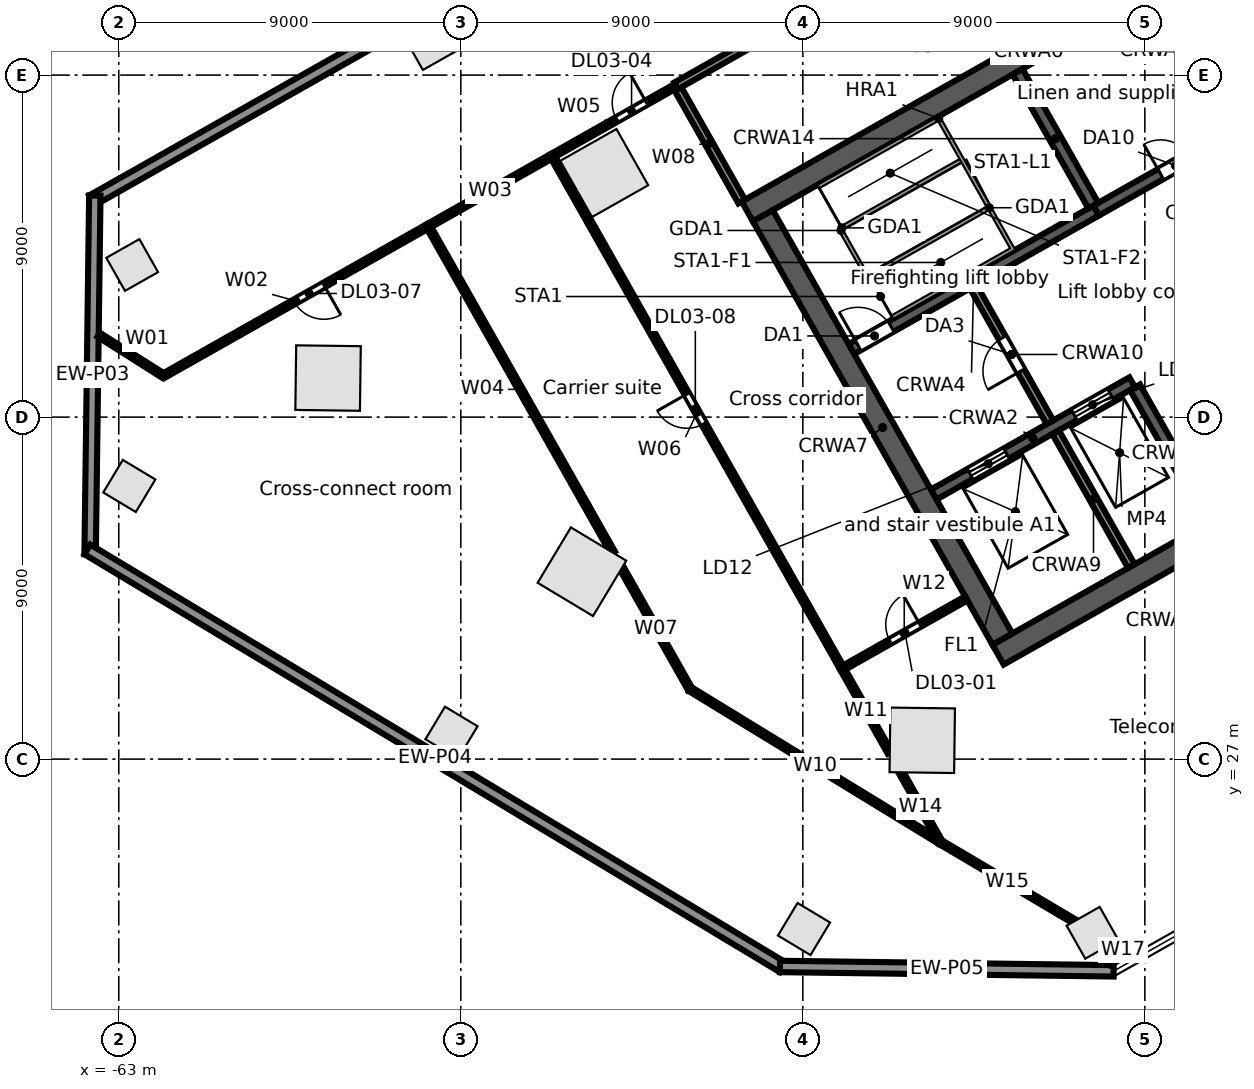
"""IFC4 building model, lengths in metres.
Left out: names, types, materials, properties, quantities, classifications, styles, units other than length and angle.
Written with IfcOpenShell. Run it as: python <this file> out.ifc"""

import sys

from ifc_helpers import new_model, si_unit, direction, frame, frame_2d, origin, origin_2d, place, context, subcontext, project, spatial, rectangle, extrude, element, fill, save


model = new_model("IFC4")
c1 = context("Model", 3, precision=1e-05, world=origin(), true_north=direction((0.0, 1.0)))
c2 = subcontext(c1, "Body", "Model", "MODEL_VIEW")
j1 = project(units=[si_unit("LENGTHUNIT", "METRE"), si_unit("PLANEANGLEUNIT", "RADIAN")], contexts=[c1])
p1 = place(None, origin())
s1 = spatial("IfcSite", under=j1, at=p1, CompositionType="ELEMENT")
p2 = place(p1, origin())
s2 = spatial("IfcBuilding", under=s1, at=p2, CompositionType="ELEMENT")
p3 = place(p2, frame((0.0, 0.0, 21.5)))
s3 = spatial("IfcBuildingStorey", under=s2, at=p3, CompositionType="ELEMENT", Elevation=21.5)
for number, where, z_axis, x_axis in (
    (1, (-50.226, 42.423, 0.0), (0.0, 0.0, 1.0), (-0.87, -0.492, 0.0)),
    (2, (-57.493, 37.027, 0.0), (0.0, 0.0, 1.0), (-0.013, -1.0, 0.0)),
    (3, (-50.812, 31.931, 0.0), (0.0, 0.0, 1.0), (0.857, -0.515, 0.0)),
    (4, (-41.858, 27.495, 0.0), (0.0, 0.0, 1.0), (1.0, -0.013, 0.0)),
):
    element("IfcColumn", number, at=place(p3, frame(where, z_axis=z_axis, x_axis=x_axis)), inside=s3, PredefinedType="COLUMN", context=c2, shape_type="SweptSolid", body=[
        extrude(rectangle(XDim=1.7, YDim=1.7, at=origin_2d()), origin(), (0.0, 0.0, 1.0), 5.0),
    ])
for number, where, z_axis, x_axis in (
    (5, (-54.81, 45.816, 0.0), (0.0, 0.0, 1.0), (-0.87, -0.492, 0.0)),
    (6, (-62.647, 40.003, 0.0), (0.0, 0.0, 1.0), (-0.87, -0.492, 0.0)),
    (7, (-62.723, 34.188, 0.0), (0.0, 0.0, 1.0), (0.857, -0.515, 0.0)),
    (8, (-54.245, 27.694, 0.0), (0.0, 0.0, 1.0), (0.857, -0.515, 0.0)),
    (9, (-44.969, 22.528, 0.0), (0.0, 0.0, 1.0), (0.857, -0.515, 0.0)),
    (10, (-37.378, 22.429, 0.0), (0.0, 0.0, 1.0), (0.87, 0.492, 0.0)),
):
    element("IfcColumn", number, at=place(p3, frame(where, z_axis=z_axis, x_axis=x_axis)), inside=s3, PredefinedType="COLUMN", context=c2, shape_type="SweptSolid", body=[
        extrude(rectangle(XDim=1.0, YDim=1.0, at=origin_2d()), origin(), (0.0, 0.0, 1.0), 4.68),
    ])
p4 = place(p3, frame((-63.707, 41.701, 0.0), z_axis=(0.0, 0.0, 1.0), x_axis=(0.870355510268, 0.492423888277, 0.0)))
e11 = element("IfcWall", 11, at=p4, inside=s3, PredefinedType="STANDARD", context=c2, shape_type="SweptSolid", body=[
    extrude(rectangle(XDim=67.903, YDim=0.3, at=frame_2d((33.952, 0.0))), origin(), (0.0, 0.0, 1.0), 4.68),
])
p5 = place(p3, frame((-63.754, 32.387, 0.0), z_axis=(0.0, 0.0, 1.0), x_axis=(0.013081929375, 0.999914427901, 0.0)))
e12 = element("IfcWall", 12, at=p5, inside=s3, PredefinedType="STANDARD", context=c2, shape_type="SweptSolid", body=[
    extrude(rectangle(XDim=9.443, YDim=0.3, at=frame_2d((4.722, 0.0))), origin(), (0.0, 0.0, 1.0), 4.68),
])
p6 = place(p3, frame((-45.526, 21.522, 0.0), z_axis=(0.0, 0.0, 1.0), x_axis=(-0.857164837164, 0.515042174903, 0.0)))
e13 = element("IfcWall", 13, at=p6, inside=s3, PredefinedType="STANDARD", context=c2, shape_type="SweptSolid", body=[
    extrude(rectangle(XDim=21.35, YDim=0.3, at=frame_2d((10.675, 0.0))), origin(), (0.0, 0.0, 1.0), 4.68),
])
p7 = place(p3, frame((-36.821, 21.428, 0.0), z_axis=(0.0, 0.0, 1.0), x_axis=(-0.999914252794, 0.013095306781, 0.0)))
e14 = element("IfcWall", 14, at=p7, inside=s3, PredefinedType="STANDARD", context=c2, shape_type="SweptSolid", body=[
    extrude(rectangle(XDim=8.781, YDim=0.3, at=frame_2d((4.391, 0.0))), origin(), (0.0, 0.0, 1.0), 4.68),
])
p8 = place(p3, frame((-39.862, 29.749, 0.0), z_axis=(0.0, 0.0, 1.0), x_axis=(0.870350116061, 0.492433422375, 0.0)))
e15 = element("IfcWall", 15, at=p8, inside=s3, PredefinedType="SOLIDWALL", context=c2, shape_type="SweptSolid", body=[
    extrude(rectangle(XDim=17.0, YDim=0.6, at=frame_2d((8.5, 0.0))), origin(), (0.0, 0.0, 1.0), 4.68),
])
p9 = place(p8, frame((7.2, 0.0, 0.0)))
e16 = element("IfcOpeningElement", 16, at=p9, cuts=e15, PredefinedType="OPENING", context=c2, shape_type="SweptSolid", body=[
    extrude(rectangle(XDim=1.2, YDim=2.1, at=frame_2d((0.6, 1.05))), frame((0.0, 0.31, 0.0), z_axis=(0.0, -1.0, 0.0), x_axis=(1.0, 0.0, 0.0)), (0.0, 0.0, 1.0), 0.62),
])
p10 = place(p3, frame((-41.556, 33.961, 0.0), z_axis=(0.0, 0.0, 1.0), x_axis=(0.870343731308, 0.492444706919, 0.0)))
e17 = element("IfcWall", 17, at=p10, inside=s3, PredefinedType="SOLIDWALL", context=c2, shape_type="SweptSolid", body=[
    extrude(rectangle(XDim=6.0, YDim=0.3, at=frame_2d((3.0, 0.0))), origin(), (0.0, 0.0, 1.0), 4.68),
])
p11 = place(p10, frame((1.1, 0.0, 0.0)))
e18 = element("IfcOpeningElement", 18, at=p11, cuts=e17, PredefinedType="OPENING", context=c2, shape_type="SweptSolid", body=[
    extrude(rectangle(XDim=1.1, YDim=2.1, at=frame_2d((0.55, 1.05))), frame((0.0, 0.16, 0.0), z_axis=(0.0, -1.0, 0.0), x_axis=(1.0, 0.0, 0.0)), (0.0, 0.0, 1.0), 0.32),
])
p12 = place(p10, frame((4.25, 0.0, 0.0)))
e19 = element("IfcOpeningElement", 19, at=p12, cuts=e17, PredefinedType="OPENING", context=c2, shape_type="SweptSolid", body=[
    extrude(rectangle(XDim=1.1, YDim=2.1, at=frame_2d((0.55, 1.05))), frame((0.0, 0.16, 0.0), z_axis=(0.0, -1.0, 0.0), x_axis=(1.0, 0.0, 0.0)), (0.0, 0.0, 1.0), 0.32),
])
p13 = place(p3, frame((-43.723, 37.791, 0.0), z_axis=(0.0, 0.0, 1.0), x_axis=(0.87035077051, 0.49243226567, 0.0)))
e20 = element("IfcWall", 20, at=p13, inside=s3, PredefinedType="SOLIDWALL", context=c2, shape_type="SweptSolid", body=[
    extrude(rectangle(XDim=7.4, YDim=0.3, at=frame_2d((3.7, 0.0))), origin(), (0.0, 0.0, 1.0), 4.68),
])
p14 = place(p13, frame((0.2, 0.0, 0.0)))
e21 = element("IfcOpeningElement", 21, at=p14, cuts=e20, PredefinedType="OPENING", context=c2, shape_type="SweptSolid", body=[
    extrude(rectangle(XDim=1.0, YDim=2.1, at=frame_2d((0.5, 1.05))), frame((0.0, 0.16, 0.0), z_axis=(0.0, -1.0, 0.0), x_axis=(1.0, 0.0, 0.0)), (0.0, 0.0, 1.0), 0.32),
])
p15 = place(p3, frame((-37.282, 41.435, 0.0), z_axis=(0.0, 0.0, 1.0), x_axis=(0.870356516133, 0.492422110414, 0.0)))
e22 = element("IfcWall", 22, at=p15, inside=s3, PredefinedType="SOLIDWALL", context=c2, shape_type="SweptSolid", body=[
    extrude(rectangle(XDim=8.4, YDim=0.3, at=frame_2d((4.2, 0.0))), origin(), (0.0, 0.0, 1.0), 4.68),
])
p16 = place(p15, frame((6.2, 0.0, 0.0)))
e23 = element("IfcOpeningElement", 23, at=p16, cuts=e22, PredefinedType="OPENING", context=c2, shape_type="SweptSolid", body=[
    extrude(rectangle(XDim=1.1, YDim=2.1, at=frame_2d((0.55, 1.05))), frame((0.0, 0.16, 0.0), z_axis=(0.0, -1.0, 0.0), x_axis=(1.0, 0.0, 0.0)), (0.0, 0.0, 1.0), 0.32),
])
p17 = place(p15, frame((1.95, 0.0, 0.0)))
e24 = element("IfcOpeningElement", 24, at=p17, cuts=e22, PredefinedType="OPENING", context=c2, shape_type="SweptSolid", body=[
    extrude(rectangle(XDim=0.9, YDim=2.1, at=frame_2d((0.45, 1.05))), frame((0.0, 0.16, 0.0), z_axis=(0.0, -1.0, 0.0), x_axis=(1.0, 0.0, 0.0)), (0.0, 0.0, 1.0), 0.32),
])
p18 = place(p3, frame((-46.461, 41.412, 0.0), z_axis=(0.0, 0.0, 1.0), x_axis=(0.870350116061, 0.492433422375, 0.0)))
e25 = element("IfcWall", 25, at=p18, inside=s3, PredefinedType="SOLIDWALL", context=c2, shape_type="SweptSolid", body=[
    extrude(rectangle(XDim=17.0, YDim=0.6, at=frame_2d((8.5, 0.0))), origin(), (0.0, 0.0, 1.0), 4.68),
])
p19 = place(p3, frame((-46.052, 41.298, 0.0), z_axis=(0.0, 0.0, 1.0), x_axis=(0.492418598281, -0.870358503186, 0.0)))
e26 = element("IfcWall", 26, at=p19, inside=s3, PredefinedType="SOLIDWALL", context=c2, shape_type="SweptSolid", body=[
    extrude(rectangle(XDim=12.8, YDim=0.6, at=frame_2d((6.4, 0.0))), origin(), (0.0, 0.0, 1.0), 4.68),
])
p20 = place(p3, frame((-38.349, 35.603, 0.0), z_axis=(0.0, 0.0, 1.0), x_axis=(0.49241474071, -0.870360685654, 0.0)))
e27 = element("IfcWall", 27, at=p20, inside=s3, PredefinedType="SOLIDWALL", context=c2, shape_type="SweptSolid", body=[
    extrude(rectangle(XDim=4.05, YDim=0.2, at=frame_2d((2.025, 0.0))), origin(), (0.0, 0.0, 1.0), 4.68),
])
p21 = place(p3, frame((-40.516, 39.433, 0.0), z_axis=(0.0, 0.0, 1.0), x_axis=(0.492453559952, -0.87033872216, 0.0)))
e28 = element("IfcWall", 28, at=p21, inside=s3, PredefinedType="PARTITIONING", context=c2, shape_type="SweptSolid", body=[
    extrude(rectangle(XDim=4.1, YDim=0.2, at=frame_2d((2.05, 0.0))), origin(), (0.0, 0.0, 1.0), 4.68),
])
p22 = place(p21, frame((1.55, 0.0, 0.0)))
e29 = element("IfcOpeningElement", 29, at=p22, cuts=e28, PredefinedType="OPENING", context=c2, shape_type="SweptSolid", body=[
    extrude(rectangle(XDim=1.0, YDim=2.1, at=frame_2d((0.5, 1.05))), frame((0.0, 0.11, 0.0), z_axis=(0.0, -1.0, 0.0), x_axis=(1.0, 0.0, 0.0)), (0.0, 0.0, 1.0), 0.22),
])
p23 = place(p3, frame((-36.26, 36.785, 0.0), z_axis=(0.0, 0.0, 1.0), x_axis=(0.492440575896, -0.870346068648, 0.0)))
e30 = element("IfcWall", 30, at=p23, inside=s3, PredefinedType="SOLIDWALL", context=c2, shape_type="SweptSolid", body=[
    extrude(rectangle(XDim=4.05, YDim=0.3, at=frame_2d((2.025, 0.0))), origin(), (0.0, 0.0, 1.0), 4.68),
])
p24 = place(p3, frame((-39.35, 45.09, 0.0), z_axis=(0.0, 0.0, 1.0), x_axis=(0.49241474071, -0.870360685654, 0.0)))
e31 = element("IfcWall", 31, at=p24, inside=s3, PredefinedType="SOLIDWALL", context=c2, shape_type="SweptSolid", body=[
    extrude(rectangle(XDim=4.05, YDim=0.3, at=frame_2d((2.025, 0.0))), origin(), (0.0, 0.0, 1.0), 4.68),
])
p25 = place(p3, frame((-35.173, 47.454, 0.0), z_axis=(0.0, 0.0, 1.0), x_axis=(0.492440575896, -0.870346068648, 0.0)))
e32 = element("IfcWall", 32, at=p25, inside=s3, PredefinedType="SOLIDWALL", context=c2, shape_type="SweptSolid", body=[
    extrude(rectangle(XDim=4.05, YDim=0.2, at=frame_2d((2.025, 0.0))), origin(), (0.0, 0.0, 1.0), 4.68),
])
p26 = place(p3, frame((-63.529, 38.167, 0.0), z_axis=(0.0, 0.0, 1.0), x_axis=(0.844913795328, -0.534902494352, 0.0)))
e33 = element("IfcWall", 33, at=p26, inside=s3, PredefinedType="PARTITIONING", context=c2, shape_type="SweptSolid", body=[
    extrude(rectangle(XDim=2.019, YDim=0.125, at=frame_2d((1.01, 0.0))), origin(), (0.0, 0.0, 1.0), 4.154),
])
p27 = place(p3, frame((-61.823, 37.087, 0.0), z_axis=(0.0, 0.0, 1.0), x_axis=(0.870379756599, 0.492381030609, 0.0)))
e34 = element("IfcWall", 34, at=p27, inside=s3, PredefinedType="PARTITIONING", context=c2, shape_type="SweptSolid", body=[
    extrude(rectangle(XDim=8.0, YDim=0.125, at=frame_2d((4.0, 0.0))), origin(), (0.0, 0.0, 1.0), 3.76),
])
p28 = place(p27, frame((3.95, 0.0, 0.0)))
e35 = element("IfcOpeningElement", 35, at=p28, cuts=e34, PredefinedType="OPENING", context=c2, shape_type="SweptSolid", body=[
    extrude(rectangle(XDim=0.9, YDim=2.1, at=frame_2d((0.45, 1.05))), frame((0.0, 0.073, 0.0), z_axis=(0.0, -1.0, 0.0), x_axis=(1.0, 0.0, 0.0)), (0.0, 0.0, 1.0), 0.145),
])
p29 = place(p3, frame((-54.86, 41.026, 0.0), z_axis=(0.0, 0.0, 1.0), x_axis=(0.870310553999, 0.492503339682, 0.0)))
e36 = element("IfcWall", 36, at=p29, inside=s3, PredefinedType="PARTITIONING", context=c2, shape_type="SweptSolid", body=[
    extrude(rectangle(XDim=3.75, YDim=0.125, at=frame_2d((1.875, 0.0))), origin(), (0.0, 0.0, 1.0), 4.048),
])
p30 = place(p3, frame((-54.86, 41.026, 0.0), z_axis=(0.0, 0.0, 1.0), x_axis=(0.492429637412, -0.870352257536, 0.0)))
e37 = element("IfcWall", 37, at=p30, inside=s3, PredefinedType="PARTITIONING", context=c2, shape_type="SweptSolid", body=[
    extrude(rectangle(XDim=9.872, YDim=0.125, at=frame_2d((4.936, 0.0))), origin(), (0.0, 0.0, 1.0), 3.742),
])
p31 = place(p3, frame((-51.596, 42.873, 0.0), z_axis=(0.0, 0.0, 1.0), x_axis=(0.87043427122, 0.492284652905, 0.0)))
e38 = element("IfcWall", 38, at=p31, inside=s3, PredefinedType="PARTITIONING", context=c2, shape_type="SweptSolid", body=[
    extrude(rectangle(XDim=3.75, YDim=0.125, at=frame_2d((1.875, 0.0))), origin(), (0.0, 0.0, 1.0), 4.68),
])
p32 = place(p31, frame((1.95, 0.0, 0.0)))
e39 = element("IfcOpeningElement", 39, at=p32, cuts=e38, PredefinedType="OPENING", context=c2, shape_type="SweptSolid", body=[
    extrude(rectangle(XDim=0.9, YDim=2.1, at=frame_2d((0.45, 1.05))), frame((0.0, 0.073, 0.0), z_axis=(0.0, -1.0, 0.0), x_axis=(1.0, 0.0, 0.0)), (0.0, 0.0, 1.0), 0.145),
])
p33 = place(p3, frame((-51.596, 42.873, 0.0), z_axis=(0.0, 0.0, 1.0), x_axis=(0.492435038471, -0.870349201692, 0.0)))
e40 = element("IfcWall", 40, at=p33, inside=s3, PredefinedType="PARTITIONING", context=c2, shape_type="SweptSolid", body=[
    extrude(rectangle(XDim=15.501, YDim=0.125, at=frame_2d((7.75, 0.0))), origin(), (0.0, 0.0, 1.0), 3.742),
])
p34 = place(p33, frame((7.2, 0.0, 0.0)))
e41 = element("IfcOpeningElement", 41, at=p34, cuts=e40, PredefinedType="OPENING", context=c2, shape_type="SweptSolid", body=[
    extrude(rectangle(XDim=0.9, YDim=2.1, at=frame_2d((0.45, 1.05))), frame((0.0, 0.073, 0.0), z_axis=(0.0, -1.0, 0.0), x_axis=(1.0, 0.0, 0.0)), (0.0, 0.0, 1.0), 0.145),
])
p35 = place(p3, frame((-49.766, 32.022, 0.0), z_axis=(0.0, 0.0, 1.0), x_axis=(0.492501810842, -0.870311419159, 0.0)))
e42 = element("IfcWall", 42, at=p35, inside=s3, PredefinedType="PARTITIONING", context=c2, shape_type="SweptSolid", body=[
    extrude(rectangle(XDim=3.655, YDim=0.125, at=frame_2d((1.828, 0.0))), origin(), (0.0, 0.0, 1.0), 3.952),
])
p36 = place(p3, frame((-48.332, 44.719, 0.0), z_axis=(0.0, 0.0, 1.0), x_axis=(0.492392845909, -0.87037307248, 0.0)))
e43 = element("IfcWall", 43, at=p36, inside=s3, PredefinedType="PARTITIONING", context=c2, shape_type="SweptSolid", body=[
    extrude(rectangle(XDim=3.5, YDim=0.2, at=frame_2d((1.75, 0.0))), origin(), (0.0, 0.0, 1.0), 3.96),
])
p37 = place(p3, frame((-48.332, 44.719, 0.0), z_axis=(0.0, 0.0, 1.0), x_axis=(0.870331650579, 0.492466057713, 0.0)))
e44 = element("IfcWall", 44, at=p37, inside=s3, PredefinedType="PARTITIONING", context=c2, shape_type="SweptSolid", body=[
    extrude(rectangle(XDim=8.5, YDim=0.2, at=frame_2d((4.25, 0.0))), origin(), (0.0, 0.0, 1.0), 4.054),
])
p38 = place(p37, frame((3.45, 0.0, 0.0)))
e45 = element("IfcOpeningElement", 45, at=p38, cuts=e44, PredefinedType="OPENING", context=c2, shape_type="SweptSolid", body=[
    extrude(rectangle(XDim=1.8, YDim=2.1, at=frame_2d((0.9, 1.05))), frame((0.0, 0.11, 0.0), z_axis=(0.0, -1.0, 0.0), x_axis=(1.0, 0.0, 0.0)), (0.0, 0.0, 1.0), 0.22),
])
p39 = place(p3, frame((-47.966, 28.841, 0.0), z_axis=(0.0, 0.0, 1.0), x_axis=(0.8531669284, -0.521637989686, 0.0)))
e46 = element("IfcWall", 46, at=p39, inside=s3, PredefinedType="PARTITIONING", context=c2, shape_type="SweptSolid", body=[
    extrude(rectangle(XDim=7.722, YDim=0.125, at=frame_2d((3.861, 0.0))), origin(), (0.0, 0.0, 1.0), 3.96),
])
p40 = place(p3, frame((-43.963, 29.382, 0.0), z_axis=(0.0, 0.0, 1.0), x_axis=(0.492408705769, -0.870364099951, 0.0)))
e47 = element("IfcWall", 47, at=p40, inside=s3, PredefinedType="PARTITIONING", context=c2, shape_type="SweptSolid", body=[
    extrude(rectangle(XDim=2.541, YDim=0.125, at=frame_2d((1.27, 0.0))), origin(), (0.0, 0.0, 1.0), 3.952),
])
p41 = place(p3, frame((-43.963, 29.382, 0.0), z_axis=(0.0, 0.0, 1.0), x_axis=(0.870259488443, 0.492593567533, 0.0)))
e48 = element("IfcWall", 48, at=p41, inside=s3, PredefinedType="PARTITIONING", context=c2, shape_type="SweptSolid", body=[
    extrude(rectangle(XDim=3.749, YDim=0.125, at=frame_2d((1.875, 0.0))), origin(), (0.0, 0.0, 1.0), 3.96),
])
p42 = place(p41, frame((1.45, 0.0, 0.0)))
e49 = element("IfcOpeningElement", 49, at=p42, cuts=e48, PredefinedType="OPENING", context=c2, shape_type="SweptSolid", body=[
    extrude(rectangle(XDim=0.9, YDim=2.1, at=frame_2d((0.45, 1.05))), frame((0.0, 0.073, 0.0), z_axis=(0.0, -1.0, 0.0), x_axis=(1.0, 0.0, 0.0)), (0.0, 0.0, 1.0), 0.145),
])
p43 = place(p3, frame((-42.418, 26.652, 0.0), z_axis=(0.0, 0.0, 1.0), x_axis=(0.492251431349, -0.870453059237, 0.0)))
e50 = element("IfcWall", 50, at=p43, inside=s3, PredefinedType="PARTITIONING", context=c2, shape_type="SweptSolid", body=[
    extrude(rectangle(XDim=2.113, YDim=0.125, at=frame_2d((1.056, 0.0))), origin(), (0.0, 0.0, 1.0), 4.68),
])
p44 = place(p3, frame((-41.378, 24.813, 0.0), z_axis=(0.0, 0.0, 1.0), x_axis=(0.860752907168, -0.509023017948, 0.0)))
e51 = element("IfcWall", 51, at=p44, inside=s3, PredefinedType="PARTITIONING", context=c2, shape_type="SweptSolid", body=[
    extrude(rectangle(XDim=4.088, YDim=0.125, at=frame_2d((2.044, 0.0))), origin(), (0.0, 0.0, 1.0), 4.68),
])
p45 = place(p3, frame((-36.866, 22.144, 0.0), z_axis=(0.0, 0.0, 1.0), x_axis=(0.861112187998, -0.508414987664, 0.0)))
e52 = element("IfcWall", 52, at=p45, inside=s3, PredefinedType="PARTITIONING", context=c2, shape_type="SweptSolid", body=[
    extrude(rectangle(XDim=0.68, YDim=0.125, at=frame_2d((0.34, 0.0))), origin(), (0.0, 0.0, 1.0), 4.68),
])
p46 = place(p11, origin())
e53 = element("IfcDoor", 53, at=p46, inside=s3, OperationType="DOUBLE_DOOR_SLIDING", PredefinedType="DOOR", context=c2, shape_type="SweptSolid", body=[
    extrude(rectangle(XDim=1.1, YDim=2.1, at=frame_2d((0.55, 1.05))), frame((0.0, 0.025, 0.0), z_axis=(0.0, -1.0, 0.0), x_axis=(1.0, 0.0, 0.0)), (0.0, 0.0, 1.0), 0.05),
])
fill(e18, e53)
p47 = place(p12, origin())
e54 = element("IfcDoor", 54, at=p47, inside=s3, OperationType="DOUBLE_DOOR_SLIDING", PredefinedType="DOOR", context=c2, shape_type="SweptSolid", body=[
    extrude(rectangle(XDim=1.1, YDim=2.1, at=frame_2d((0.55, 1.05))), frame((0.0, 0.025, 0.0), z_axis=(0.0, -1.0, 0.0), x_axis=(1.0, 0.0, 0.0)), (0.0, 0.0, 1.0), 0.05),
])
fill(e19, e54)
p48 = place(p14, origin())
e55 = element("IfcDoor", 55, at=p48, inside=s3, OperationType="SINGLE_SWING_LEFT", PredefinedType="DOOR", context=c2, shape_type="SweptSolid", body=[
    extrude(rectangle(XDim=1.0, YDim=2.1, at=frame_2d((0.5, 1.05))), frame((0.0, 0.025, 0.0), z_axis=(0.0, -1.0, 0.0), x_axis=(1.0, 0.0, 0.0)), (0.0, 0.0, 1.0), 0.05),
])
fill(e21, e55)
p49 = place(p22, frame((1.0, 0.0, 0.0), z_axis=(0.0, 0.0, 1.0), x_axis=(-1.0, 0.0, 0.0)))
e56 = element("IfcDoor", 56, at=p49, inside=s3, OperationType="SINGLE_SWING_LEFT", PredefinedType="DOOR", context=c2, shape_type="SweptSolid", body=[
    extrude(rectangle(XDim=1.0, YDim=2.1, at=frame_2d((0.5, 1.05))), frame((0.0, 0.025, 0.0), z_axis=(0.0, -1.0, 0.0), x_axis=(1.0, 0.0, 0.0)), (0.0, 0.0, 1.0), 0.05),
])
fill(e29, e56)
p50 = place(p17, origin())
e57 = element("IfcDoor", 57, at=p50, inside=s3, OperationType="SINGLE_SWING_LEFT", PredefinedType="DOOR", context=c2, shape_type="SweptSolid", body=[
    extrude(rectangle(XDim=0.9, YDim=2.1, at=frame_2d((0.45, 1.05))), frame((0.0, 0.025, 0.0), z_axis=(0.0, -1.0, 0.0), x_axis=(1.0, 0.0, 0.0)), (0.0, 0.0, 1.0), 0.05),
])
fill(e24, e57)
p51 = place(p42, origin())
e58 = element("IfcDoor", 58, at=p51, inside=s3, OperationType="SINGLE_SWING_RIGHT", PredefinedType="DOOR", context=c2, shape_type="SweptSolid", body=[
    extrude(rectangle(XDim=0.9, YDim=2.1, at=frame_2d((0.45, 1.05))), frame((0.0, 0.025, 0.0), z_axis=(0.0, -1.0, 0.0), x_axis=(1.0, 0.0, 0.0)), (0.0, 0.0, 1.0), 0.05),
])
fill(e49, e58)
p52 = place(p32, origin())
e59 = element("IfcDoor", 59, at=p52, inside=s3, OperationType="SINGLE_SWING_RIGHT", PredefinedType="DOOR", context=c2, shape_type="SweptSolid", body=[
    extrude(rectangle(XDim=0.9, YDim=2.1, at=frame_2d((0.45, 1.05))), frame((0.0, 0.025, 0.0), z_axis=(0.0, -1.0, 0.0), x_axis=(1.0, 0.0, 0.0)), (0.0, 0.0, 1.0), 0.05),
])
fill(e39, e59)
p53 = place(p28, frame((0.9, 0.0, 0.0), z_axis=(0.0, 0.0, 1.0), x_axis=(-1.0, 0.0, 0.0)))
e60 = element("IfcDoor", 60, at=p53, inside=s3, OperationType="SINGLE_SWING_LEFT", PredefinedType="DOOR", context=c2, shape_type="SweptSolid", body=[
    extrude(rectangle(XDim=0.9, YDim=2.1, at=frame_2d((0.45, 1.05))), frame((0.0, 0.025, 0.0), z_axis=(0.0, -1.0, 0.0), x_axis=(1.0, 0.0, 0.0)), (0.0, 0.0, 1.0), 0.05),
])
fill(e35, e60)
p54 = place(p34, frame((0.9, 0.0, 0.0), z_axis=(0.0, 0.0, 1.0), x_axis=(-1.0, 0.0, 0.0)))
e61 = element("IfcDoor", 61, at=p54, inside=s3, OperationType="SINGLE_SWING_RIGHT", PredefinedType="DOOR", context=c2, shape_type="SweptSolid", body=[
    extrude(rectangle(XDim=0.9, YDim=2.1, at=frame_2d((0.45, 1.05))), frame((0.0, 0.025, 0.0), z_axis=(0.0, -1.0, 0.0), x_axis=(1.0, 0.0, 0.0)), (0.0, 0.0, 1.0), 0.05),
])
fill(e41, e61)
save(model, sys.argv[1])
